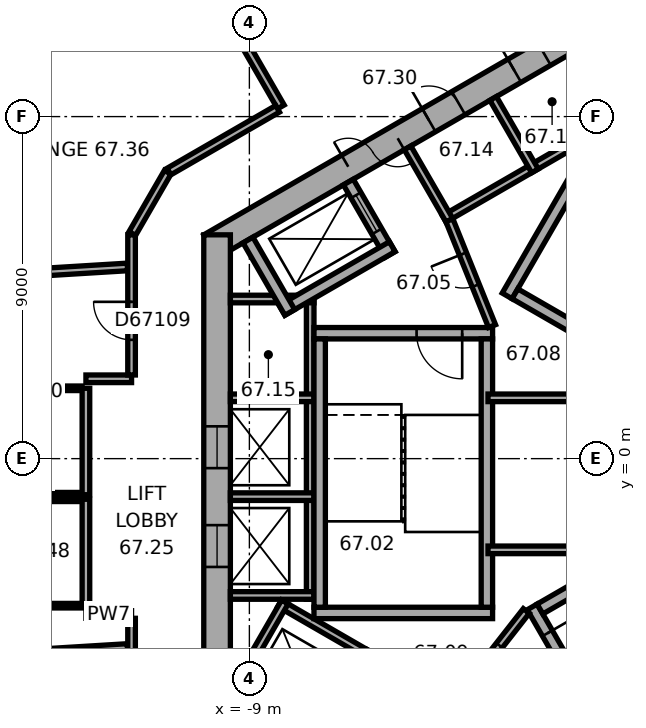
"""IFC4 building model, lengths in metres.
Left out: names, types, materials, properties, quantities, classifications, styles, units other than length and angle.
Written with IfcOpenShell. Run it as: python <this file> out.ifc"""

import sys

from ifc_helpers import new_model, si_unit, direction, frame, frame_2d, origin, place, context, subcontext, project, spatial, rectangle, extrude, element, fill, save


model = new_model("IFC4")
c1 = context("Model", 3, precision=1e-05, world=origin(), true_north=direction((0.0, 1.0)))
c2 = subcontext(c1, "Body", "Model", "MODEL_VIEW")
j1 = project(units=[si_unit("LENGTHUNIT", "METRE"), si_unit("PLANEANGLEUNIT", "RADIAN")], contexts=[c1])
p1 = place(None, origin())
s1 = spatial("IfcSite", under=j1, at=p1, CompositionType="ELEMENT")
p2 = place(p1, origin())
s2 = spatial("IfcBuilding", under=s1, at=p2, CompositionType="ELEMENT")
p3 = place(p2, frame((0.0, 0.0, 270.9)))
s3 = spatial("IfcBuildingStorey", under=s2, at=p3, CompositionType="ELEMENT", Elevation=270.9)
p4 = place(p3, frame((0.175, 11.475, 0.0), z_axis=(0.0, 0.0, 1.0), x_axis=(-0.866026453023, -0.499998182661, 0.0)))
e1 = element("IfcWall", 1, at=p4, inside=s3, PredefinedType="SHEAR", context=c2, shape_type="SweptSolid", body=[
    extrude(rectangle(XDim=11.778, YDim=0.7, at=frame_2d((5.889, 0.0))), origin(), (0.0, 0.0, 1.0), 3.7),
])
p5 = place(p4, frame((6.089, 0.0, 0.0)))
e2 = element("IfcOpeningElement", 2, at=p5, cuts=e1, PredefinedType="OPENING", context=c2, shape_type="SweptSolid", body=[
    extrude(rectangle(XDim=1.5, YDim=2.1, at=frame_2d((0.75, 1.05))), frame((0.0, 0.36, 0.0), z_axis=(0.0, -1.0, 0.0), x_axis=(1.0, 0.0, 0.0)), (0.0, 0.0, 1.0), 0.72),
])
p6 = place(p4, frame((1.639, 0.0, 0.0)))
e3 = element("IfcOpeningElement", 3, at=p6, cuts=e1, PredefinedType="OPENING", context=c2, shape_type="SweptSolid", body=[
    extrude(rectangle(XDim=0.9, YDim=2.1, at=frame_2d((0.45, 1.05))), frame((0.0, 0.36, 0.0), z_axis=(0.0, -1.0, 0.0), x_axis=(1.0, 0.0, 0.0)), (0.0, 0.0, 1.0), 0.72),
])
p7 = place(p4, frame((4.239, 0.0, 0.0)))
e4 = element("IfcOpeningElement", 4, at=p7, cuts=e1, PredefinedType="OPENING", context=c2, shape_type="SweptSolid", body=[
    extrude(rectangle(XDim=0.9, YDim=2.1, at=frame_2d((0.45, 1.05))), frame((0.0, 0.36, 0.0), z_axis=(0.0, -1.0, 0.0), x_axis=(1.0, 0.0, 0.0)), (0.0, 0.0, 1.0), 0.72),
])
p8 = place(p3, frame((-9.85, 5.889, 0.0), z_axis=(0.0, 0.0, 1.0), x_axis=(0.0, -1.0, 0.0)))
e5 = element("IfcWall", 5, at=p8, inside=s3, PredefinedType="SHEAR", context=c2, shape_type="SweptSolid", body=[
    extrude(rectangle(XDim=11.778, YDim=0.7, at=frame_2d((5.889, 0.0))), origin(), (0.0, 0.0, 1.0), 3.7),
])
p9 = place(p8, frame((5.039, 0.0, 0.0)))
e6 = element("IfcOpeningElement", 6, at=p9, cuts=e5, PredefinedType="OPENING", context=c2, shape_type="SweptSolid", body=[
    extrude(rectangle(XDim=1.1, YDim=2.1, at=frame_2d((0.55, 1.05))), frame((0.0, 0.36, 0.0), z_axis=(0.0, -1.0, 0.0), x_axis=(1.0, 0.0, 0.0)), (0.0, 0.0, 1.0), 0.72),
])
p10 = place(p8, frame((7.639, 0.0, 0.0)))
e7 = element("IfcOpeningElement", 7, at=p10, cuts=e5, PredefinedType="OPENING", context=c2, shape_type="SweptSolid", body=[
    extrude(rectangle(XDim=1.1, YDim=2.1, at=frame_2d((0.55, 1.05))), frame((0.0, 0.36, 0.0), z_axis=(0.0, -1.0, 0.0), x_axis=(1.0, 0.0, 0.0)), (0.0, 0.0, 1.0), 0.72),
])
p11 = place(p3, frame((0.803, 9.009, 0.0), z_axis=(0.0, 0.0, 1.0), x_axis=(-0.866028230842, -0.499995103361, 0.0)))
e8 = element("IfcWall", 8, at=p11, inside=s3, PredefinedType="PARTITIONING", context=c2, shape_type="SweptSolid", body=[
    extrude(rectangle(XDim=5.4, YDim=0.2, at=frame_2d((2.7, 0.0))), origin(), (0.0, 0.0, 1.0), 3.42),
])
for number, where, z_axis, x_axis in (
    (9, (-1.485, 7.572, 0.0), (0.0, 0.0, 1.0), (-0.5, 0.866, 0.0)),
    (10, (-3.737, 6.272, 0.0), (0.0, 0.0, 1.0), (-0.5, 0.866, 0.0)),
):
    element("IfcWall", number, at=place(p3, frame(where, z_axis=z_axis, x_axis=x_axis)), inside=s3, PredefinedType="PARTITIONING", context=c2, shape_type="SweptSolid", body=[
        extrude(rectangle(XDim=2.2, YDim=0.2, at=frame_2d((1.1, 0.0))), origin(), (0.0, 0.0, 1.0), 3.42),
    ])
p12 = place(p3, frame((-7.4, 4.3, 0.0), z_axis=(0.0, 0.0, 1.0), x_axis=(0.0, -1.0, 0.0)))
e11 = element("IfcWall", 11, at=p12, inside=s3, PredefinedType="PARTITIONING", context=c2, shape_type="SweptSolid", body=[
    extrude(rectangle(XDim=8.0, YDim=0.2, at=frame_2d((4.0, 0.0))), origin(), (0.0, 0.0, 1.0), 3.42),
])
for number, where, z_axis, x_axis in (
    (12, (-7.3, 4.2, 0.0), (0.0, 0.0, 1.0), (-1.0, 0.0, 0.0)),
    (13, (-7.3, 1.6, 0.0), (0.0, 0.0, 1.0), (-1.0, 0.0, 0.0)),
    (14, (-7.3, -1.0, 0.0), (0.0, 0.0, 1.0), (-1.0, 0.0, 0.0)),
    (15, (-7.3, -3.6, 0.0), (0.0, 0.0, 1.0), (-1.0, 0.0, 0.0)),
):
    element("IfcWall", number, at=place(p3, frame(where, z_axis=z_axis, x_axis=x_axis)), inside=s3, PredefinedType="PARTITIONING", context=c2, shape_type="SweptSolid", body=[
        extrude(rectangle(XDim=2.2, YDim=0.2, at=frame_2d((1.1, 0.0))), origin(), (0.0, 0.0, 1.0), 3.42),
    ])
p13 = place(p3, frame((-8.203, -3.809, 0.0), z_axis=(0.0, 0.0, 1.0), x_axis=(0.866028230842, -0.499995103361, 0.0)))
e16 = element("IfcWall", 16, at=p13, inside=s3, PredefinedType="PARTITIONING", context=c2, shape_type="SweptSolid", body=[
    extrude(rectangle(XDim=5.4, YDim=0.2, at=frame_2d((2.7, 0.0))), origin(), (0.0, 0.0, 1.0), 3.42),
])
p14 = place(p3, frame((-8.067, -3.772, 0.0), z_axis=(0.0, 0.0, 1.0), x_axis=(-0.50002983664, -0.866008176907, 0.0)))
e17 = element("IfcWall", 17, at=p14, inside=s3, PredefinedType="PARTITIONING", context=c2, shape_type="SweptSolid", body=[
    extrude(rectangle(XDim=2.2, YDim=0.2, at=frame_2d((1.1, 0.0))), origin(), (0.0, 0.0, 1.0), 3.42),
])
p15 = place(p3, frame((-2.216, 4.282, 0.0), z_axis=(0.0, 0.0, 1.0), x_axis=(0.499977259774, 0.866038532462, 0.0)))
e18 = element("IfcWall", 18, at=p15, inside=s3, PredefinedType="SHEAR", context=c2, shape_type="SweptSolid", body=[
    extrude(rectangle(XDim=4.7, YDim=0.3, at=frame_2d((2.35, 0.0))), origin(), (0.0, 0.0, 1.0), 3.42),
])
p16 = place(p3, frame((4.103, 0.807, 0.0), z_axis=(0.0, 0.0, 1.0), x_axis=(-0.866027801685, 0.499995846692, 0.0)))
e19 = element("IfcWall", 19, at=p16, inside=s3, PredefinedType="SHEAR", context=c2, shape_type="SweptSolid", body=[
    extrude(rectangle(XDim=7.06, YDim=0.3, at=frame_2d((3.53, 0.0))), origin(), (0.0, 0.0, 1.0), 3.42),
])
p17 = place(p3, frame((-2.6, 3.3, 0.0), z_axis=(0.0, 0.0, 1.0), x_axis=(-1.0, 0.0, 0.0)))
e20 = element("IfcWall", 20, at=p17, inside=s3, PredefinedType="SHEAR", context=c2, shape_type="SweptSolid", body=[
    extrude(rectangle(XDim=4.7, YDim=0.3, at=frame_2d((2.35, 0.0))), origin(), (0.0, 0.0, 1.0), 3.42),
])
p18 = place(p17, frame((0.8, 0.0, 0.0)))
e21 = element("IfcOpeningElement", 21, at=p18, cuts=e20, PredefinedType="OPENING", context=c2, shape_type="SweptSolid", body=[
    extrude(rectangle(XDim=1.2, YDim=2.1, at=frame_2d((0.6, 1.05))), frame((0.0, 0.16, 0.0), z_axis=(0.0, -1.0, 0.0), x_axis=(1.0, 0.0, 0.0)), (0.0, 0.0, 1.0), 0.32),
])
p19 = place(p3, frame((-2.6, -4.06, 0.0), z_axis=(0.0, 0.0, 1.0), x_axis=(-1.0, 0.0, 0.0)))
e22 = element("IfcWall", 22, at=p19, inside=s3, PredefinedType="SHEAR", context=c2, shape_type="SweptSolid", body=[
    extrude(rectangle(XDim=4.7, YDim=0.3, at=frame_2d((2.35, 0.0))), origin(), (0.0, 0.0, 1.0), 3.42),
])
for number, where, z_axis, x_axis in (
    (23, (-2.75, 3.15, 0.0), (0.0, 0.0, 1.0), (0.0, -1.0, 0.0)),
    (24, (-7.15, 3.15, 0.0), (0.0, 0.0, 1.0), (0.0, -1.0, 0.0)),
):
    element("IfcWall", number, at=place(p3, frame(where, z_axis=z_axis, x_axis=x_axis)), inside=s3, PredefinedType="SHEAR", context=c2, shape_type="SweptSolid", body=[
        extrude(rectangle(XDim=7.06, YDim=0.3, at=frame_2d((3.53, 0.0))), origin(), (0.0, 0.0, 1.0), 3.42),
    ])
p20 = place(p3, frame((-1.558, -3.902, 0.0), z_axis=(0.0, 0.0, 1.0), x_axis=(0.499977259774, -0.866038532462, 0.0)))
e25 = element("IfcWall", 25, at=p20, inside=s3, PredefinedType="SHEAR", context=c2, shape_type="SweptSolid", body=[
    extrude(rectangle(XDim=4.7, YDim=0.3, at=frame_2d((2.35, 0.0))), origin(), (0.0, 0.0, 1.0), 3.42),
])
p21 = place(p20, frame((0.8, 0.0, 0.0)))
e26 = element("IfcOpeningElement", 26, at=p21, cuts=e25, PredefinedType="OPENING", context=c2, shape_type="SweptSolid", body=[
    extrude(rectangle(XDim=1.2, YDim=2.1, at=frame_2d((0.6, 1.05))), frame((0.0, 0.16, 0.0), z_axis=(0.0, -1.0, 0.0), x_axis=(1.0, 0.0, 0.0)), (0.0, 0.0, 1.0), 0.32),
])
p22 = place(p3, frame((-1.353, -3.957, 0.0), z_axis=(0.0, 0.0, 1.0), x_axis=(0.866027801685, 0.499995846692, 0.0)))
e27 = element("IfcWall", 27, at=p22, inside=s3, PredefinedType="SHEAR", context=c2, shape_type="SweptSolid", body=[
    extrude(rectangle(XDim=7.06, YDim=0.3, at=frame_2d((3.53, 0.0))), origin(), (0.0, 0.0, 1.0), 3.42),
])
p23 = place(p3, frame((-5.295, 5.372, 0.0), z_axis=(0.0, 0.0, 1.0), x_axis=(-0.500077893725, 0.86598042715, 0.0)))
e28 = element("IfcWall", 28, at=p23, inside=s3, PredefinedType="SHEAR", context=c2, shape_type="SweptSolid", body=[
    extrude(rectangle(XDim=2.2, YDim=0.3, at=frame_2d((1.1, 0.0))), origin(), (0.0, 0.0, 1.0), 3.42),
])
p24 = place(p23, frame((0.7, 0.0, 0.0)))
e29 = element("IfcOpeningElement", 29, at=p24, cuts=e28, PredefinedType="OPENING", context=c2, shape_type="SweptSolid", body=[
    extrude(rectangle(XDim=1.1, YDim=2.1, at=frame_2d((0.55, 1.05))), frame((0.0, 0.16, 0.0), z_axis=(0.0, -1.0, 0.0), x_axis=(1.0, 0.0, 0.0)), (0.0, 0.0, 1.0), 0.32),
])
p25 = place(p3, frame((-5.24, 5.577, 0.0), z_axis=(0.0, 0.0, 1.0), x_axis=(-0.866014461049, -0.500018952895, 0.0)))
e30 = element("IfcWall", 30, at=p25, inside=s3, PredefinedType="SHEAR", context=c2, shape_type="SweptSolid", body=[
    extrude(rectangle(XDim=3.35, YDim=0.3, at=frame_2d((1.675, 0.0))), origin(), (0.0, 0.0, 1.0), 3.42),
])
p26 = place(p3, frame((-7.937, 3.847, 0.0), z_axis=(0.0, 0.0, 1.0), x_axis=(-0.50002983664, 0.866008176907, 0.0)))
e31 = element("IfcWall", 31, at=p26, inside=s3, PredefinedType="SHEAR", context=c2, shape_type="SweptSolid", body=[
    extrude(rectangle(XDim=2.2, YDim=0.3, at=frame_2d((1.1, 0.0))), origin(), (0.0, 0.0, 1.0), 3.42),
])
p27 = place(p3, frame((-2.615, 3.487, 0.0), z_axis=(0.0, 0.0, 1.0), x_axis=(-0.373576831041, 0.92759924068, 0.0)))
e32 = element("IfcWall", 32, at=p27, inside=s3, PredefinedType="PARTITIONING", context=c2, shape_type="SweptSolid", body=[
    extrude(rectangle(XDim=3.002, YDim=0.2, at=frame_2d((1.501, 0.0))), origin(), (0.0, 0.0, 1.0), 3.42),
])
p28 = place(p27, frame((1.15, 0.0, 0.0)))
e33 = element("IfcOpeningElement", 33, at=p28, cuts=e32, PredefinedType="OPENING", context=c2, shape_type="SweptSolid", body=[
    extrude(rectangle(XDim=0.9, YDim=2.1, at=frame_2d((0.45, 1.05))), frame((0.0, 0.11, 0.0), z_axis=(0.0, -1.0, 0.0), x_axis=(1.0, 0.0, 0.0)), (0.0, 0.0, 1.0), 0.22),
])
p29 = place(p3, frame((-1.712, -4.008, 0.0), z_axis=(0.0, 0.0, 1.0), x_axis=(-0.616549420702, -0.787316208287, 0.0)))
e34 = element("IfcWall", 34, at=p29, inside=s3, PredefinedType="PARTITIONING", context=c2, shape_type="SweptSolid", body=[
    extrude(rectangle(XDim=3.002, YDim=0.2, at=frame_2d((1.501, 0.0))), origin(), (0.0, 0.0, 1.0), 3.42),
])
p30 = place(p29, frame((1.15, 0.0, 0.0)))
e35 = element("IfcOpeningElement", 35, at=p30, cuts=e34, PredefinedType="OPENING", context=c2, shape_type="SweptSolid", body=[
    extrude(rectangle(XDim=0.9, YDim=2.1, at=frame_2d((0.45, 1.05))), frame((0.0, 0.11, 0.0), z_axis=(0.0, -1.0, 0.0), x_axis=(1.0, 0.0, 0.0)), (0.0, 0.0, 1.0), 0.22),
])
p31 = place(p3, frame((-2.72, -2.4, 0.0), z_axis=(0.0, 0.0, 1.0), x_axis=(1.0, 0.0, 0.0)))
e36 = element("IfcWall", 36, at=p31, inside=s3, PredefinedType="PARTITIONING", context=c2, shape_type="SweptSolid", body=[
    extrude(rectangle(XDim=3.883, YDim=0.2, at=frame_2d((1.941, 0.0))), origin(), (0.0, 0.0, 1.0), 3.42),
])
p32 = place(p3, frame((-2.72, 1.6, 0.0), z_axis=(0.0, 0.0, 1.0), x_axis=(1.0, 0.0, 0.0)))
e37 = element("IfcWall", 37, at=p32, inside=s3, PredefinedType="PARTITIONING", context=c2, shape_type="SweptSolid", body=[
    extrude(rectangle(XDim=5.269, YDim=0.2, at=frame_2d((2.634, 0.0))), origin(), (0.0, 0.0, 1.0), 3.42),
])
p33 = place(p3, frame((-18.768, 4.643, 0.0), z_axis=(0.0, 0.0, 1.0), x_axis=(0.99813496285, 0.0610458511, 0.0)))
e38 = element("IfcWall", 38, at=p33, inside=s3, PredefinedType="PARTITIONING", context=c2, shape_type="SweptSolid", body=[
    extrude(rectangle(XDim=6.571, YDim=0.2, at=frame_2d((3.285, 0.0))), origin(), (0.0, 0.0, 1.0), 3.42),
])
p34 = place(p3, frame((-18.158, -5.333, 0.0), z_axis=(0.0, 0.0, 1.0), x_axis=(0.998135365626, 0.061039265125, 0.0)))
e39 = element("IfcWall", 39, at=p34, inside=s3, PredefinedType="PARTITIONING", context=c2, shape_type="SweptSolid", body=[
    extrude(rectangle(XDim=5.96, YDim=0.2, at=frame_2d((2.98, 0.0))), origin(), (0.0, 0.0, 1.0), 2.87),
])
p35 = place(p3, frame((-16.441, -1.069, 0.0), z_axis=(0.0, 0.0, 1.0), x_axis=(1.0, 0.0, 0.0)))
e40 = element("IfcWall", 40, at=p35, inside=s3, PredefinedType="PARTITIONING", context=c2, shape_type="SweptSolid", body=[
    extrude(rectangle(XDim=3.04, YDim=0.12, at=frame_2d((1.52, 0.0))), origin(), (0.0, 0.0, 1.0), 3.42),
])
p36 = place(p3, frame((-16.441, 1.851, 0.0), z_axis=(0.0, 0.0, 1.0), x_axis=(1.0, 0.0, 0.0)))
e41 = element("IfcWall", 41, at=p36, inside=s3, PredefinedType="PARTITIONING", context=c2, shape_type="SweptSolid", body=[
    extrude(rectangle(XDim=3.04, YDim=0.12, at=frame_2d((1.52, 0.0))), origin(), (0.0, 0.0, 1.0), 3.42),
])
p37 = place(p36, frame((1.07, 0.0, 0.0)))
e42 = element("IfcOpeningElement", 42, at=p37, cuts=e41, PredefinedType="OPENING", context=c2, shape_type="SweptSolid", body=[
    extrude(rectangle(XDim=0.9, YDim=2.1, at=frame_2d((0.45, 1.05))), frame((0.0, 0.07, 0.0), z_axis=(0.0, -1.0, 0.0), x_axis=(1.0, 0.0, 0.0)), (0.0, 0.0, 1.0), 0.14),
])
for number, where, z_axis, x_axis in (
    (43, (-13.401, -3.869, 0.0), (0.0, 0.0, 1.0), (-1.0, 0.0, 0.0)),
    (44, (-13.401, -0.949, 0.0), (0.0, 0.0, 1.0), (-1.0, 0.0, 0.0)),
):
    element("IfcWall", number, at=place(p3, frame(where, z_axis=z_axis, x_axis=x_axis)), inside=s3, PredefinedType="PARTITIONING", context=c2, shape_type="SweptSolid", body=[
        extrude(rectangle(XDim=3.04, YDim=0.12, at=frame_2d((1.52, 0.0))), origin(), (0.0, 0.0, 1.0), 3.42),
    ])
p38 = place(p3, frame((-13.301, -4.101, 0.0), z_axis=(0.0, 0.0, 1.0), x_axis=(1.0, 0.0, 0.0)))
e45 = element("IfcWall", 45, at=p38, inside=s3, PredefinedType="PARTITIONING", context=c2, shape_type="SweptSolid", body=[
    extrude(rectangle(XDim=1.201, YDim=0.2, at=frame_2d((0.601, 0.0))), origin(), (0.0, 0.0, 1.0), 3.42),
])
p39 = place(p3, frame((-13.301, -1.069, 0.0), z_axis=(0.0, 0.0, 1.0), x_axis=(0.0, -1.0, 0.0)))
e46 = element("IfcWall", 46, at=p39, inside=s3, PredefinedType="PARTITIONING", context=c2, shape_type="SweptSolid", body=[
    extrude(rectangle(XDim=2.8, YDim=0.2, at=frame_2d((1.4, 0.0))), origin(), (0.0, 0.0, 1.0), 3.42),
])
p40 = place(p3, frame((-13.301, 1.851, 0.0), z_axis=(0.0, 0.0, 1.0), x_axis=(0.0, -1.0, 0.0)))
e47 = element("IfcWall", 47, at=p40, inside=s3, PredefinedType="PARTITIONING", context=c2, shape_type="SweptSolid", body=[
    extrude(rectangle(XDim=2.8, YDim=0.2, at=frame_2d((1.4, 0.0))), origin(), (0.0, 0.0, 1.0), 3.42),
])
p41 = place(p3, frame((-12.1, -4.201, 0.0), z_axis=(0.0, 0.0, 1.0), x_axis=(0.0, -1.0, 0.0)))
e48 = element("IfcWall", 48, at=p41, inside=s3, PredefinedType="PARTITIONING", context=c2, shape_type="SweptSolid", body=[
    extrude(rectangle(XDim=1.648, YDim=0.2, at=frame_2d((0.824, 0.0))), origin(), (0.0, 0.0, 1.0), 3.42),
])
p42 = place(p3, frame((-12.1, 2.101, 0.0), z_axis=(0.0, 0.0, 1.0), x_axis=(-1.0, 0.0, 0.0)))
e49 = element("IfcWall", 49, at=p42, inside=s3, PredefinedType="PARTITIONING", context=c2, shape_type="SweptSolid", body=[
    extrude(rectangle(XDim=1.201, YDim=0.2, at=frame_2d((0.601, 0.0))), origin(), (0.0, 0.0, 1.0), 3.42),
])
p43 = place(p3, frame((-12.1, 5.889, 0.0), z_axis=(0.0, 0.0, 1.0), x_axis=(0.0, -1.0, 0.0)))
e50 = element("IfcWall", 50, at=p43, inside=s3, PredefinedType="PARTITIONING", context=c2, shape_type="SweptSolid", body=[
    extrude(rectangle(XDim=3.688, YDim=0.2, at=frame_2d((1.844, 0.0))), origin(), (0.0, 0.0, 1.0), 3.42),
])
p44 = place(p43, frame((1.763, 0.0, 0.0)))
e51 = element("IfcOpeningElement", 51, at=p44, cuts=e50, PredefinedType="OPENING", context=c2, shape_type="SweptSolid", body=[
    extrude(rectangle(XDim=1.0, YDim=2.1, at=frame_2d((0.5, 1.05))), frame((0.0, 0.11, 0.0), z_axis=(0.0, -1.0, 0.0), x_axis=(1.0, 0.0, 0.0)), (0.0, 0.0, 1.0), 0.22),
])
p45 = place(p3, frame((-11.345, 14.754, 0.0), z_axis=(0.0, 0.0, 1.0), x_axis=(0.500005339912, -0.866022320763, 0.0)))
e52 = element("IfcWall", 52, at=p45, inside=s3, PredefinedType="PARTITIONING", context=c2, shape_type="SweptSolid", body=[
    extrude(rectangle(XDim=6.35, YDim=0.2, at=frame_2d((3.175, 0.0))), origin(), (0.0, 0.0, 1.0), 3.42),
])
p46 = place(p45, frame((2.675, 0.0, 0.0)))
e53 = element("IfcOpeningElement", 53, at=p46, cuts=e52, PredefinedType="OPENING", context=c2, shape_type="SweptSolid", body=[
    extrude(rectangle(XDim=1.0, YDim=2.1, at=frame_2d((0.5, 1.05))), frame((0.0, 0.11, 0.0), z_axis=(0.0, -1.0, 0.0), x_axis=(1.0, 0.0, 0.0)), (0.0, 0.0, 1.0), 0.22),
])
p47 = place(p3, frame((-11.15, 7.534, 0.0), z_axis=(0.0, 0.0, 1.0), x_axis=(-0.500063286585, -0.865988862174, 0.0)))
e54 = element("IfcWall", 54, at=p47, inside=s3, PredefinedType="PARTITIONING", context=c2, shape_type="SweptSolid", body=[
    extrude(rectangle(XDim=1.86, YDim=0.2, at=frame_2d((0.93, 0.0))), origin(), (0.0, 0.0, 1.0), 3.42),
])
p48 = place(p3, frame((-8.257, 9.205, 0.0), z_axis=(0.0, 0.0, 1.0), x_axis=(-0.866031626602, -0.49998922161, 0.0)))
e55 = element("IfcWall", 55, at=p48, inside=s3, PredefinedType="PARTITIONING", context=c2, shape_type="SweptSolid", body=[
    extrude(rectangle(XDim=3.301, YDim=0.2, at=frame_2d((1.65, 0.0))), origin(), (0.0, 0.0, 1.0), 3.42),
])
p49 = place(p5, origin())
e56 = element("IfcDoor", 56, at=p49, inside=s3, OperationType="DOUBLE_DOOR_SINGLE_SWING", PredefinedType="DOOR", context=c2, shape_type="SweptSolid", body=[
    extrude(rectangle(XDim=1.5, YDim=2.1, at=frame_2d((0.75, 1.05))), frame((0.0, 0.025, 0.0), z_axis=(0.0, -1.0, 0.0), x_axis=(1.0, 0.0, 0.0)), (0.0, 0.0, 1.0), 0.05),
])
fill(e2, e56)
p50 = place(p18, origin())
e57 = element("IfcDoor", 57, at=p50, inside=s3, OperationType="SINGLE_SWING_RIGHT", PredefinedType="DOOR", context=c2, shape_type="SweptSolid", body=[
    extrude(rectangle(XDim=1.2, YDim=2.1, at=frame_2d((0.6, 1.05))), frame((0.0, 0.025, 0.0), z_axis=(0.0, -1.0, 0.0), x_axis=(1.0, 0.0, 0.0)), (0.0, 0.0, 1.0), 0.05),
])
fill(e21, e57)
p51 = place(p21, origin())
e58 = element("IfcDoor", 58, at=p51, inside=s3, OperationType="SINGLE_SWING_RIGHT", PredefinedType="DOOR", context=c2, shape_type="SweptSolid", body=[
    extrude(rectangle(XDim=1.2, YDim=2.1, at=frame_2d((0.6, 1.05))), frame((0.0, 0.025, 0.0), z_axis=(0.0, -1.0, 0.0), x_axis=(1.0, 0.0, 0.0)), (0.0, 0.0, 1.0), 0.05),
])
fill(e26, e58)
p52 = place(p28, origin())
e59 = element("IfcDoor", 59, at=p52, inside=s3, OperationType="SINGLE_SWING_LEFT", PredefinedType="DOOR", context=c2, shape_type="SweptSolid", body=[
    extrude(rectangle(XDim=0.9, YDim=2.1, at=frame_2d((0.45, 1.05))), frame((0.0, 0.025, 0.0), z_axis=(0.0, -1.0, 0.0), x_axis=(1.0, 0.0, 0.0)), (0.0, 0.0, 1.0), 0.05),
])
fill(e33, e59)
p53 = place(p30, origin())
e60 = element("IfcDoor", 60, at=p53, inside=s3, OperationType="SINGLE_SWING_LEFT", PredefinedType="DOOR", context=c2, shape_type="SweptSolid", body=[
    extrude(rectangle(XDim=0.9, YDim=2.1, at=frame_2d((0.45, 1.05))), frame((0.0, 0.025, 0.0), z_axis=(0.0, -1.0, 0.0), x_axis=(1.0, 0.0, 0.0)), (0.0, 0.0, 1.0), 0.05),
])
fill(e35, e60)
p54 = place(p6, origin())
e61 = element("IfcDoor", 61, at=p54, inside=s3, OperationType="SINGLE_SWING_LEFT", PredefinedType="DOOR", context=c2, shape_type="SweptSolid", body=[
    extrude(rectangle(XDim=0.9, YDim=2.1, at=frame_2d((0.45, 1.05))), frame((0.0, 0.025, 0.0), z_axis=(0.0, -1.0, 0.0), x_axis=(1.0, 0.0, 0.0)), (0.0, 0.0, 1.0), 0.05),
])
fill(e3, e61)
p55 = place(p7, origin())
e62 = element("IfcDoor", 62, at=p55, inside=s3, OperationType="SINGLE_SWING_LEFT", PredefinedType="DOOR", context=c2, shape_type="SweptSolid", body=[
    extrude(rectangle(XDim=0.9, YDim=2.1, at=frame_2d((0.45, 1.05))), frame((0.0, 0.025, 0.0), z_axis=(0.0, -1.0, 0.0), x_axis=(1.0, 0.0, 0.0)), (0.0, 0.0, 1.0), 0.05),
])
fill(e4, e62)
p56 = place(p24, origin())
e63 = element("IfcDoor", 63, at=p56, inside=s3, OperationType="DOUBLE_DOOR_SLIDING", PredefinedType="DOOR", context=c2, shape_type="SweptSolid", body=[
    extrude(rectangle(XDim=1.1, YDim=2.1, at=frame_2d((0.55, 1.05))), frame((0.0, 0.025, 0.0), z_axis=(0.0, -1.0, 0.0), x_axis=(1.0, 0.0, 0.0)), (0.0, 0.0, 1.0), 0.05),
])
fill(e29, e63)
p57 = place(p9, origin())
e64 = element("IfcDoor", 64, at=p57, inside=s3, OperationType="DOUBLE_DOOR_SLIDING", PredefinedType="DOOR", context=c2, shape_type="SweptSolid", body=[
    extrude(rectangle(XDim=1.1, YDim=2.1, at=frame_2d((0.55, 1.05))), frame((0.0, 0.025, 0.0), z_axis=(0.0, -1.0, 0.0), x_axis=(1.0, 0.0, 0.0)), (0.0, 0.0, 1.0), 0.05),
])
fill(e6, e64)
p58 = place(p10, origin())
e65 = element("IfcDoor", 65, at=p58, inside=s3, OperationType="DOUBLE_DOOR_SLIDING", PredefinedType="DOOR", context=c2, shape_type="SweptSolid", body=[
    extrude(rectangle(XDim=1.1, YDim=2.1, at=frame_2d((0.55, 1.05))), frame((0.0, 0.025, 0.0), z_axis=(0.0, -1.0, 0.0), x_axis=(1.0, 0.0, 0.0)), (0.0, 0.0, 1.0), 0.05),
])
fill(e7, e65)
p59 = place(p44, origin())
e66 = element("IfcDoor", 66, at=p59, inside=s3, OperationType="SINGLE_SWING_LEFT", PredefinedType="DOOR", context=c2, shape_type="SweptSolid", body=[
    extrude(rectangle(XDim=1.0, YDim=2.1, at=frame_2d((0.5, 1.05))), frame((0.0, 0.025, 0.0), z_axis=(0.0, -1.0, 0.0), x_axis=(1.0, 0.0, 0.0)), (0.0, 0.0, 1.0), 0.05),
])
fill(e51, e66)
save(model, sys.argv[1])
